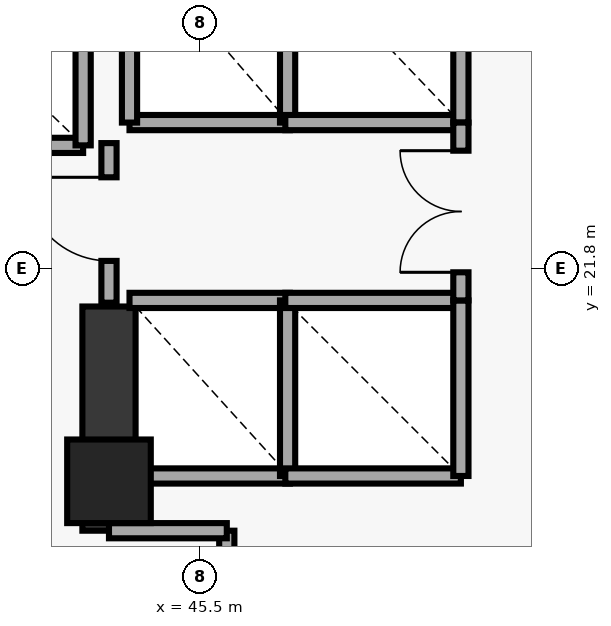
"""IFC4 building model, lengths in metres.
Left out: names, types, materials, properties, quantities, classifications, styles, units other than length and angle.
Written with IfcOpenShell. Run it as: python <this file> out.ifc"""

import sys

from ifc_helpers import new_model, si_unit, direction, frame, frame_2d, origin, origin_2d, place, context, subcontext, project, spatial, rectangle, extrude, element, fill, save


model = new_model("IFC4")
c1 = context("Model", 3, precision=1e-05, world=origin(), true_north=direction((0.0, 1.0)))
c2 = subcontext(c1, "Body", "Model", "MODEL_VIEW")
j1 = project(units=[si_unit("LENGTHUNIT", "METRE"), si_unit("PLANEANGLEUNIT", "RADIAN")], contexts=[c1])
p1 = place(None, origin())
s1 = spatial("IfcSite", under=j1, at=p1, CompositionType="ELEMENT")
p2 = place(p1, origin())
s2 = spatial("IfcBuilding", under=s1, at=p2, CompositionType="ELEMENT")
p3 = place(p2, frame((0.0, 0.0, 102.0)))
s3 = spatial("IfcBuildingStorey", under=s2, at=p3, CompositionType="ELEMENT", Elevation=102.0)
p4 = place(p3, frame((44.3, 19.0, 0.0), z_axis=(0.0, 0.0, 1.0), x_axis=(1.0, 0.0, 0.0)))
e1 = element("IfcColumn", 1, at=p4, inside=s3, PredefinedType="PILASTER", context=c2, shape_type="SweptSolid", body=[
    extrude(rectangle(XDim=1.1, YDim=1.1, at=origin_2d()), origin(), (0.0, 0.0, 1.0), 3.7),
])
p5 = place(p3, frame((44.3, 18.35, 0.0), z_axis=(0.0, 0.0, 1.0), x_axis=(0.0, 1.0, 0.0)))
e2 = element("IfcWall", 2, at=p5, inside=s3, PredefinedType="SHEAR", context=c2, shape_type="SweptSolid", body=[
    extrude(rectangle(XDim=2.95, YDim=0.7, at=frame_2d((1.475, 0.0))), origin(), (0.0, 0.0, 1.0), 3.7),
])
p6 = place(p3, frame((44.57, 23.72, 0.0), z_axis=(0.0, 0.0, 1.0), x_axis=(1.0, 0.0, 0.0)))
e3 = element("IfcWall", 3, at=p6, inside=s3, PredefinedType="SOLIDWALL", context=c2, shape_type="SweptSolid", body=[
    extrude(rectangle(XDim=2.11, YDim=0.2, at=frame_2d((1.055, 0.0))), origin(), (0.0, 0.0, 1.0), 3.7),
])
for number, where, z_axis, x_axis in (
    (4, (44.57, 23.72, 0.0), (0.0, 0.0, 1.0), (0.0, 1.0, 0.0)),
    (5, (46.65, 23.72, 0.0), (0.0, 0.0, 1.0), (0.0, 1.0, 0.0)),
):
    element("IfcWall", number, at=place(p3, frame(where, z_axis=z_axis, x_axis=x_axis)), inside=s3, PredefinedType="SOLIDWALL", context=c2, shape_type="SweptSolid", body=[
        extrude(rectangle(XDim=2.41, YDim=0.2, at=frame_2d((1.205, 0.0))), origin(), (0.0, 0.0, 1.0), 3.7),
    ])
p7 = place(p3, frame((46.62, 23.72, 0.0), z_axis=(0.0, 0.0, 1.0), x_axis=(1.0, 0.0, 0.0)))
e6 = element("IfcWall", 6, at=p7, inside=s3, PredefinedType="SOLIDWALL", context=c2, shape_type="SweptSolid", body=[
    extrude(rectangle(XDim=2.31, YDim=0.2, at=frame_2d((1.155, 0.0))), origin(), (0.0, 0.0, 1.0), 3.7),
])
p8 = place(p3, frame((48.93, 23.72, 0.0), z_axis=(0.0, 0.0, 1.0), x_axis=(0.0, 1.0, 0.0)))
e7 = element("IfcWall", 7, at=p8, inside=s3, PredefinedType="SOLIDWALL", context=c2, shape_type="SweptSolid", body=[
    extrude(rectangle(XDim=2.41, YDim=0.2, at=frame_2d((1.205, 0.0))), origin(), (0.0, 0.0, 1.0), 3.7),
])
for number, where, z_axis, x_axis in (
    (8, (44.57, 19.07, 0.0), (0.0, 0.0, 1.0), (1.0, 0.0, 0.0)),
    (9, (44.57, 21.38, 0.0), (0.0, 0.0, 1.0), (1.0, 0.0, 0.0)),
):
    element("IfcWall", number, at=place(p3, frame(where, z_axis=z_axis, x_axis=x_axis)), inside=s3, PredefinedType="SOLIDWALL", context=c2, shape_type="SweptSolid", body=[
        extrude(rectangle(XDim=2.11, YDim=0.2, at=frame_2d((1.055, 0.0))), origin(), (0.0, 0.0, 1.0), 3.7),
    ])
for number, where, z_axis, x_axis in (
    (10, (46.65, 19.07, 0.0), (0.0, 0.0, 1.0), (0.0, 1.0, 0.0)),
    (11, (46.62, 19.07, 0.0), (0.0, 0.0, 1.0), (1.0, 0.0, 0.0)),
    (12, (46.62, 21.38, 0.0), (0.0, 0.0, 1.0), (1.0, 0.0, 0.0)),
    (13, (48.93, 19.07, 0.0), (0.0, 0.0, 1.0), (0.0, 1.0, 0.0)),
):
    element("IfcWall", number, at=place(p3, frame(where, z_axis=z_axis, x_axis=x_axis)), inside=s3, PredefinedType="SOLIDWALL", context=c2, shape_type="SweptSolid", body=[
        extrude(rectangle(XDim=2.31, YDim=0.2, at=frame_2d((1.155, 0.0))), origin(), (0.0, 0.0, 1.0), 3.7),
    ])
p9 = place(p3, frame((41.46, 23.42, 0.0), z_axis=(0.0, 0.0, 1.0), x_axis=(1.0, 0.0, 0.0)))
e14 = element("IfcWall", 14, at=p9, inside=s3, PredefinedType="SOLIDWALL", context=c2, shape_type="SweptSolid", body=[
    extrude(rectangle(XDim=2.5, YDim=0.2, at=frame_2d((1.25, 0.0))), origin(), (0.0, 0.0, 1.0), 3.7),
])
p10 = place(p3, frame((43.96, 23.42, 0.0), z_axis=(0.0, 0.0, 1.0), x_axis=(0.0, 1.0, 0.0)))
e15 = element("IfcWall", 15, at=p10, inside=s3, PredefinedType="SOLIDWALL", context=c2, shape_type="SweptSolid", body=[
    extrude(rectangle(XDim=2.41, YDim=0.2, at=frame_2d((1.205, 0.0))), origin(), (0.0, 0.0, 1.0), 3.7),
])
p11 = place(p3, frame((48.93, 21.38, 0.0), z_axis=(0.0, 0.0, 1.0), x_axis=(0.0, 1.0, 0.0)))
e16 = element("IfcWall", 16, at=p11, inside=s3, PredefinedType="SOLIDWALL", context=c2, shape_type="SweptSolid", body=[
    extrude(rectangle(XDim=2.34, YDim=0.2, at=frame_2d((1.17, 0.0))), origin(), (0.0, 0.0, 1.0), 3.7),
])
p12 = place(p11, frame((0.37, 0.0, 0.0)))
e17 = element("IfcOpeningElement", 17, at=p12, cuts=e16, PredefinedType="OPENING", context=c2, shape_type="SweptSolid", body=[
    extrude(rectangle(XDim=1.6, YDim=2.2, at=frame_2d((0.8, 1.1))), frame((0.0, 0.11, 0.0), z_axis=(0.0, -1.0, 0.0), x_axis=(1.0, 0.0, 0.0)), (0.0, 0.0, 1.0), 0.22),
])
p13 = place(p3, frame((44.3, 21.35, 0.0), z_axis=(0.0, 0.0, 1.0), x_axis=(0.0, 1.0, 0.0)))
e18 = element("IfcWall", 18, at=p13, inside=s3, PredefinedType="SOLIDWALL", context=c2, shape_type="SweptSolid", body=[
    extrude(rectangle(XDim=2.1, YDim=0.2, at=frame_2d((1.05, 0.0))), origin(), (0.0, 0.0, 1.0), 2.92),
])
p14 = place(p13, frame((0.55, 0.0, 0.0)))
e19 = element("IfcOpeningElement", 19, at=p14, cuts=e18, PredefinedType="OPENING", context=c2, shape_type="SweptSolid", body=[
    extrude(rectangle(XDim=1.1, YDim=2.15, at=frame_2d((0.55, 1.075))), frame((0.0, 0.11, 0.0), z_axis=(0.0, -1.0, 0.0), x_axis=(1.0, 0.0, 0.0)), (0.0, 0.0, 1.0), 0.22),
])
p15 = place(p3, frame((45.85, 16.05, 0.0), z_axis=(0.0, 0.0, 1.0), x_axis=(0.0, 1.0, 0.0)))
e20 = element("IfcWall", 20, at=p15, inside=s3, PredefinedType="SOLIDWALL", context=c2, shape_type="SweptSolid", body=[
    extrude(rectangle(XDim=2.3, YDim=0.2, at=frame_2d((1.15, 0.0))), origin(), (0.0, 0.0, 1.0), 3.7),
])
p16 = place(p3, frame((44.3, 18.35, 0.0), z_axis=(0.0, 0.0, 1.0), x_axis=(1.0, 0.0, 0.0)))
e21 = element("IfcWall", 21, at=p16, inside=s3, PredefinedType="SOLIDWALL", context=c2, shape_type="SweptSolid", body=[
    extrude(rectangle(XDim=1.55, YDim=0.2, at=frame_2d((0.775, 0.0))), origin(), (0.0, 0.0, 1.0), 3.7),
])
p17 = place(p3, frame((49.508, 14.822, 0.0), z_axis=(0.0, 0.0, 1.0), x_axis=(0.558319056182, 0.829626320402, 0.0)))
e22 = element("IfcWall", 22, at=p17, inside=s3, PredefinedType="PARTITIONING", context=c2, shape_type="SweptSolid", body=[
    extrude(rectangle(XDim=4.229, YDim=0.16, at=frame_2d((2.114, 0.0))), origin(), (0.0, 0.0, 1.0), 3.7),
])
p18 = place(p12, origin())
e23 = element("IfcDoor", 23, at=p18, inside=s3, OperationType="DOUBLE_DOOR_SINGLE_SWING", PredefinedType="DOOR", context=c2, shape_type="SweptSolid", body=[
    extrude(rectangle(XDim=1.6, YDim=2.2, at=frame_2d((0.8, 1.1))), frame((0.0, 0.025, 0.0), z_axis=(0.0, -1.0, 0.0), x_axis=(1.0, 0.0, 0.0)), (0.0, 0.0, 1.0), 0.05),
])
fill(e17, e23)
p19 = place(p14, origin())
e24 = element("IfcDoor", 24, at=p19, inside=s3, OperationType="SINGLE_SWING_RIGHT", PredefinedType="DOOR", context=c2, shape_type="SweptSolid", body=[
    extrude(rectangle(XDim=1.1, YDim=2.15, at=frame_2d((0.55, 1.075))), frame((0.0, 0.025, 0.0), z_axis=(0.0, -1.0, 0.0), x_axis=(1.0, 0.0, 0.0)), (0.0, 0.0, 1.0), 0.05),
])
fill(e19, e24)
save(model, sys.argv[1])
